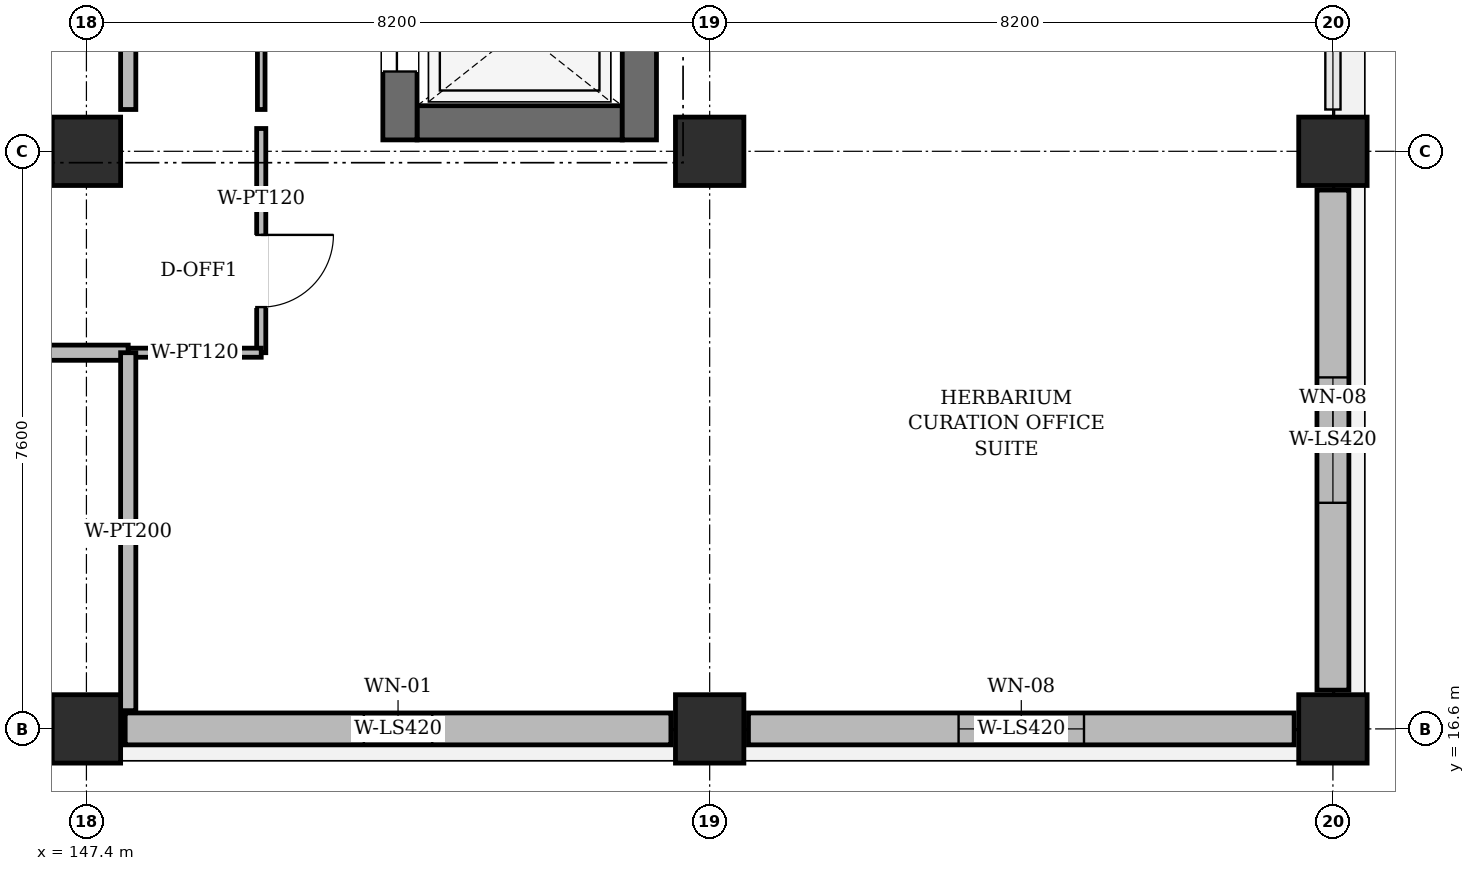
"""IFC4 building model, lengths in metres.
Left out: names, types, materials, properties, quantities, classifications, styles, units other than length and angle.
Written with IfcOpenShell. Run it as: python <this file> out.ifc"""

import sys

from ifc_helpers import new_model, si_unit, direction, frame, frame_2d, origin, origin_2d, place, context, subcontext, project, spatial, rectangle, extrude, element, fill, save


model = new_model("IFC4")
c1 = context("Model", 3, precision=1e-05, world=origin(), true_north=direction((0.0, 1.0)))
c2 = subcontext(c1, "Body", "Model", "MODEL_VIEW")
j1 = project(units=[si_unit("LENGTHUNIT", "METRE"), si_unit("PLANEANGLEUNIT", "RADIAN")], contexts=[c1])
p1 = place(None, origin())
s1 = spatial("IfcSite", under=j1, at=p1, CompositionType="ELEMENT")
p2 = place(p1, origin())
s2 = spatial("IfcBuilding", under=s1, at=p2, CompositionType="ELEMENT")
p3 = place(p2, frame((0.0, 0.0, 10.2)))
s3 = spatial("IfcBuildingStorey", under=s2, at=p3, CompositionType="ELEMENT", Elevation=10.2)
p4 = place(p3, frame((147.4, 16.6, 0.0), z_axis=(0.0, 0.0, 1.0), x_axis=(1.0, 0.0, 0.0)))
e1 = element("IfcColumn", 1, at=p4, inside=s3, PredefinedType="COLUMN", context=c2, shape_type="SweptSolid", body=[
    extrude(rectangle(XDim=0.9, YDim=0.9, at=origin_2d()), origin(), (0.0, 0.0, 1.0), 4.545),
])
p5 = place(p3, frame((147.4, 24.2, 0.0), z_axis=(0.0, 0.0, 1.0), x_axis=(1.0, 0.0, 0.0)))
e2 = element("IfcColumn", 2, at=p5, inside=s3, PredefinedType="COLUMN", context=c2, shape_type="SweptSolid", body=[
    extrude(rectangle(XDim=0.9, YDim=0.9, at=origin_2d()), origin(), (0.0, 0.0, 1.0), 4.51),
])
p6 = place(p3, frame((155.6, 16.6, 0.0), z_axis=(0.0, 0.0, 1.0), x_axis=(1.0, 0.0, 0.0)))
e3 = element("IfcColumn", 3, at=p6, inside=s3, PredefinedType="COLUMN", context=c2, shape_type="SweptSolid", body=[
    extrude(rectangle(XDim=0.9, YDim=0.9, at=origin_2d()), origin(), (0.0, 0.0, 1.0), 4.545),
])
p7 = place(p3, frame((155.6, 24.2, 0.0), z_axis=(0.0, 0.0, 1.0), x_axis=(1.0, 0.0, 0.0)))
e4 = element("IfcColumn", 4, at=p7, inside=s3, PredefinedType="COLUMN", context=c2, shape_type="SweptSolid", body=[
    extrude(rectangle(XDim=0.9, YDim=0.9, at=origin_2d()), origin(), (0.0, 0.0, 1.0), 4.51),
])
for number, where, z_axis, x_axis in (
    (5, (163.8, 16.6, 0.0), (0.0, 0.0, 1.0), (1.0, 0.0, 0.0)),
    (6, (163.8, 24.2, 0.0), (0.0, 0.0, 1.0), (1.0, 0.0, 0.0)),
):
    element("IfcColumn", number, at=place(p3, frame(where, z_axis=z_axis, x_axis=x_axis)), inside=s3, PredefinedType="COLUMN", context=c2, shape_type="SweptSolid", body=[
        extrude(rectangle(XDim=0.9, YDim=0.9, at=origin_2d()), origin(), (0.0, 0.0, 1.0), 4.545),
    ])
p8 = place(p3, frame((147.91, 16.6, 0.0), z_axis=(0.0, 0.0, 1.0), x_axis=(1.0, 0.0, 0.0)))
e7 = element("IfcWall", 7, at=p8, inside=s3, PredefinedType="SOLIDWALL", context=c2, shape_type="SweptSolid", body=[
    extrude(rectangle(XDim=7.18, YDim=0.42, at=frame_2d((3.59, 0.0))), origin(), (0.0, 0.0, 1.0), 3.93),
])
p9 = place(p8, frame((3.14, 0.0, 0.95)))
e8 = element("IfcOpeningElement", 8, at=p9, cuts=e7, PredefinedType="OPENING", context=c2, shape_type="SweptSolid", body=[
    extrude(rectangle(XDim=0.9, YDim=2.1, at=frame_2d((0.45, 1.05))), frame((0.0, 0.222, 0.0), z_axis=(0.0, -1.0, 0.0), x_axis=(1.0, 0.0, 0.0)), (0.0, 0.0, 1.0), 0.444),
])
p10 = place(p3, frame((156.11, 16.6, 0.0), z_axis=(0.0, 0.0, 1.0), x_axis=(1.0, 0.0, 0.0)))
e9 = element("IfcWall", 9, at=p10, inside=s3, PredefinedType="SOLIDWALL", context=c2, shape_type="SweptSolid", body=[
    extrude(rectangle(XDim=7.18, YDim=0.42, at=frame_2d((3.59, 0.0))), origin(), (0.0, 0.0, 1.0), 3.93),
])
p11 = place(p10, frame((2.765, 0.0, 0.95)))
e10 = element("IfcOpeningElement", 10, at=p11, cuts=e9, PredefinedType="OPENING", context=c2, shape_type="SweptSolid", body=[
    extrude(rectangle(XDim=1.65, YDim=2.0, at=frame_2d((0.825, 1.0))), frame((0.0, 0.222, 0.0), z_axis=(0.0, -1.0, 0.0), x_axis=(1.0, 0.0, 0.0)), (0.0, 0.0, 1.0), 0.444),
])
p12 = place(p3, frame((163.8, 17.11, 0.0), z_axis=(0.0, 0.0, 1.0), x_axis=(0.0, 1.0, 0.0)))
e11 = element("IfcWall", 11, at=p12, inside=s3, PredefinedType="SOLIDWALL", context=c2, shape_type="SweptSolid", body=[
    extrude(rectangle(XDim=6.58, YDim=0.42, at=frame_2d((3.29, 0.0))), origin(), (0.0, 0.0, 1.0), 3.93),
])
p13 = place(p12, frame((2.465, 0.0, 0.95)))
e12 = element("IfcOpeningElement", 12, at=p13, cuts=e11, PredefinedType="OPENING", context=c2, shape_type="SweptSolid", body=[
    extrude(rectangle(XDim=1.65, YDim=2.0, at=frame_2d((0.825, 1.0))), frame((0.0, 0.222, 0.0), z_axis=(0.0, -1.0, 0.0), x_axis=(1.0, 0.0, 0.0)), (0.0, 0.0, 1.0), 0.444),
])
p14 = place(p3, frame((151.75, 24.575, 0.0), z_axis=(0.0, 0.0, 1.0), x_axis=(1.0, 0.0, 0.0)))
e13 = element("IfcWall", 13, at=p14, inside=s3, PredefinedType="SHEAR", context=c2, shape_type="SweptSolid", body=[
    extrude(rectangle(XDim=2.7, YDim=0.45, at=frame_2d((1.35, 0.0))), origin(), (0.0, 0.0, 1.0), 4.51),
])
p15 = place(p3, frame((151.525, 24.35, 0.0), z_axis=(0.0, 0.0, 1.0), x_axis=(0.0, 1.0, 0.0)))
e14 = element("IfcWall", 14, at=p15, inside=s3, PredefinedType="SHEAR", context=c2, shape_type="SweptSolid", body=[
    extrude(rectangle(XDim=2.9, YDim=0.45, at=frame_2d((1.45, 0.0))), origin(), (0.0, 0.0, 1.0), 4.51),
])
p16 = place(p15, frame((0.9, 0.0, 0.0)))
e15 = element("IfcOpeningElement", 15, at=p16, cuts=e14, PredefinedType="OPENING", context=c2, shape_type="SweptSolid", body=[
    extrude(rectangle(XDim=1.1, YDim=2.2, at=frame_2d((0.55, 1.1))), frame((0.0, 0.237, 0.0), z_axis=(0.0, -1.0, 0.0), x_axis=(1.0, 0.0, 0.0)), (0.0, 0.0, 1.0), 0.474),
])
p17 = place(p3, frame((154.675, 24.35, 0.0), z_axis=(0.0, 0.0, 1.0), x_axis=(0.0, 1.0, 0.0)))
e16 = element("IfcWall", 16, at=p17, inside=s3, PredefinedType="SHEAR", context=c2, shape_type="SweptSolid", body=[
    extrude(rectangle(XDim=2.9, YDim=0.45, at=frame_2d((1.45, 0.0))), origin(), (0.0, 0.0, 1.0), 4.51),
])
p18 = place(p3, frame((147.95, 31.75, 0.0), z_axis=(0.0, 0.0, 1.0), x_axis=(0.0, -1.0, 0.0)))
e17 = element("IfcWall", 17, at=p18, inside=s3, PredefinedType="PARTITIONING", context=c2, shape_type="SweptSolid", body=[
    extrude(rectangle(XDim=7.0, YDim=0.2, at=frame_2d((3.5, 0.0))), origin(), (0.0, 0.0, 1.0), 4.405),
])
p19 = place(p18, frame((2.75, 0.0, 0.0)))
e18 = element("IfcOpeningElement", 18, at=p19, cuts=e17, PredefinedType="OPENING", context=c2, shape_type="SweptSolid", body=[
    extrude(rectangle(XDim=1.5, YDim=2.2, at=frame_2d((0.75, 1.1))), frame((0.0, 0.112, 0.0), z_axis=(0.0, -1.0, 0.0), x_axis=(1.0, 0.0, 0.0)), (0.0, 0.0, 1.0), 0.224),
])
p20 = place(p3, frame((149.7, 24.75, 0.0), z_axis=(0.0, 0.0, 1.0), x_axis=(0.0, 1.0, 0.0)))
e19 = element("IfcWall", 19, at=p20, inside=s3, PredefinedType="PARTITIONING", context=c2, shape_type="SweptSolid", body=[
    extrude(rectangle(XDim=11.3, YDim=0.1, at=frame_2d((5.65, 0.0))), origin(), (0.0, 0.0, 1.0), 4.405),
])
p21 = place(p20, frame((4.75, 0.0, 0.0)))
e20 = element("IfcOpeningElement", 20, at=p21, cuts=e19, PredefinedType="OPENING", context=c2, shape_type="SweptSolid", body=[
    extrude(rectangle(XDim=1.8, YDim=2.4, at=frame_2d((0.9, 1.2))), frame((0.0, 0.062, 0.0), z_axis=(0.0, -1.0, 0.0), x_axis=(1.0, 0.0, 0.0)), (0.0, 0.0, 1.0), 0.124),
])
p22 = place(p3, frame((147.95, 21.55, 0.0), z_axis=(0.0, 0.0, 1.0), x_axis=(-1.0, 0.0, 0.0)))
e21 = element("IfcWall", 21, at=p22, inside=s3, PredefinedType="PARTITIONING", context=c2, shape_type="SweptSolid", body=[
    extrude(rectangle(XDim=49.35, YDim=0.2, at=frame_2d((24.675, 0.0))), origin(), (0.0, 0.0, 1.0), 4.085),
])
p23 = place(p22, frame((23.875, 0.0, 0.0)))
e22 = element("IfcOpeningElement", 22, at=p23, cuts=e21, PredefinedType="OPENING", context=c2, shape_type="SweptSolid", body=[
    extrude(rectangle(XDim=1.6, YDim=2.3, at=frame_2d((0.8, 1.15))), frame((0.0, 0.112, 0.0), z_axis=(0.0, -1.0, 0.0), x_axis=(1.0, 0.0, 0.0)), (0.0, 0.0, 1.0), 0.224),
])
p24 = place(p3, frame((149.7, 24.5, 0.0), z_axis=(0.0, 0.0, 1.0), x_axis=(0.0, -1.0, 0.0)))
e23 = element("IfcWall", 23, at=p24, inside=s3, PredefinedType="PARTITIONING", context=c2, shape_type="SweptSolid", body=[
    extrude(rectangle(XDim=0.8, YDim=0.12, at=frame_2d((0.4, 0.0))), origin(), (0.0, 0.0, 1.0), 4.405),
])
p25 = place(p3, frame((149.7, 23.7, 0.0), z_axis=(0.0, 0.0, 1.0), x_axis=(0.0, -1.0, 0.0)))
e24 = element("IfcWall", 24, at=p25, inside=s3, PredefinedType="PARTITIONING", context=c2, shape_type="SweptSolid", body=[
    extrude(rectangle(XDim=2.15, YDim=0.12, at=frame_2d((1.075, 0.0))), origin(), (0.0, 0.0, 1.0), 4.405),
])
p26 = place(p25, frame((0.6, 0.0, 0.0)))
e25 = element("IfcOpeningElement", 25, at=p26, cuts=e24, PredefinedType="OPENING", context=c2, shape_type="SweptSolid", body=[
    extrude(rectangle(XDim=0.95, YDim=2.2, at=frame_2d((0.475, 1.1))), frame((0.0, 0.072, 0.0), z_axis=(0.0, -1.0, 0.0), x_axis=(1.0, 0.0, 0.0)), (0.0, 0.0, 1.0), 0.144),
])
p27 = place(p3, frame((149.7, 21.55, 0.0), z_axis=(0.0, 0.0, 1.0), x_axis=(-1.0, 0.0, 0.0)))
e26 = element("IfcWall", 26, at=p27, inside=s3, PredefinedType="PARTITIONING", context=c2, shape_type="SweptSolid", body=[
    extrude(rectangle(XDim=1.75, YDim=0.12, at=frame_2d((0.875, 0.0))), origin(), (0.0, 0.0, 1.0), 4.085),
])
p28 = place(p3, frame((147.95, 21.55, 0.0), z_axis=(0.0, 0.0, 1.0), x_axis=(0.0, -1.0, 0.0)))
e27 = element("IfcWall", 27, at=p28, inside=s3, PredefinedType="PARTITIONING", context=c2, shape_type="SweptSolid", body=[
    extrude(rectangle(XDim=4.71, YDim=0.2, at=frame_2d((2.355, 0.0))), origin(), (0.0, 0.0, 1.0), 4.405),
])
p29 = place(p9, origin())
e28 = element("IfcWindow", 28, at=p29, inside=s3, PartitioningType="SINGLE_PANEL", PredefinedType="WINDOW", context=c2, shape_type="SweptSolid", body=[
    extrude(rectangle(XDim=0.9, YDim=2.1, at=frame_2d((0.45, 1.05))), frame((0.0, 0.03, 0.0), z_axis=(0.0, -1.0, 0.0), x_axis=(1.0, 0.0, 0.0)), (0.0, 0.0, 1.0), 0.06),
])
fill(e8, e28)
p30 = place(p11, origin())
e29 = element("IfcWindow", 29, at=p30, inside=s3, PartitioningType="DOUBLE_PANEL_VERTICAL", PredefinedType="WINDOW", context=c2, shape_type="SweptSolid", body=[
    extrude(rectangle(XDim=1.65, YDim=2.0, at=frame_2d((0.825, 1.0))), frame((0.0, 0.03, 0.0), z_axis=(0.0, -1.0, 0.0), x_axis=(1.0, 0.0, 0.0)), (0.0, 0.0, 1.0), 0.06),
])
fill(e10, e29)
p31 = place(p13, origin())
e30 = element("IfcWindow", 30, at=p31, inside=s3, PartitioningType="DOUBLE_PANEL_VERTICAL", PredefinedType="WINDOW", context=c2, shape_type="SweptSolid", body=[
    extrude(rectangle(XDim=1.65, YDim=2.0, at=frame_2d((0.825, 1.0))), frame((0.0, 0.03, 0.0), z_axis=(0.0, -1.0, 0.0), x_axis=(1.0, 0.0, 0.0)), (0.0, 0.0, 1.0), 0.06),
])
fill(e12, e30)
p32 = place(p16, origin())
e31 = element("IfcDoor", 31, at=p32, inside=s3, OperationType="DOUBLE_DOOR_SLIDING", PredefinedType="DOOR", context=c2, shape_type="SweptSolid", body=[
    extrude(rectangle(XDim=1.1, YDim=2.2, at=frame_2d((0.55, 1.1))), frame((0.0, 0.025, 0.0), z_axis=(0.0, -1.0, 0.0), x_axis=(1.0, 0.0, 0.0)), (0.0, 0.0, 1.0), 0.05),
])
fill(e15, e31)
p33 = place(p26, origin())
e32 = element("IfcDoor", 32, at=p33, inside=s3, OperationType="SINGLE_SWING_LEFT", PredefinedType="DOOR", context=c2, shape_type="SweptSolid", body=[
    extrude(rectangle(XDim=0.95, YDim=2.2, at=frame_2d((0.475, 1.1))), frame((0.0, 0.025, 0.0), z_axis=(0.0, -1.0, 0.0), x_axis=(1.0, 0.0, 0.0)), (0.0, 0.0, 1.0), 0.05),
])
fill(e25, e32)
save(model, sys.argv[1])
